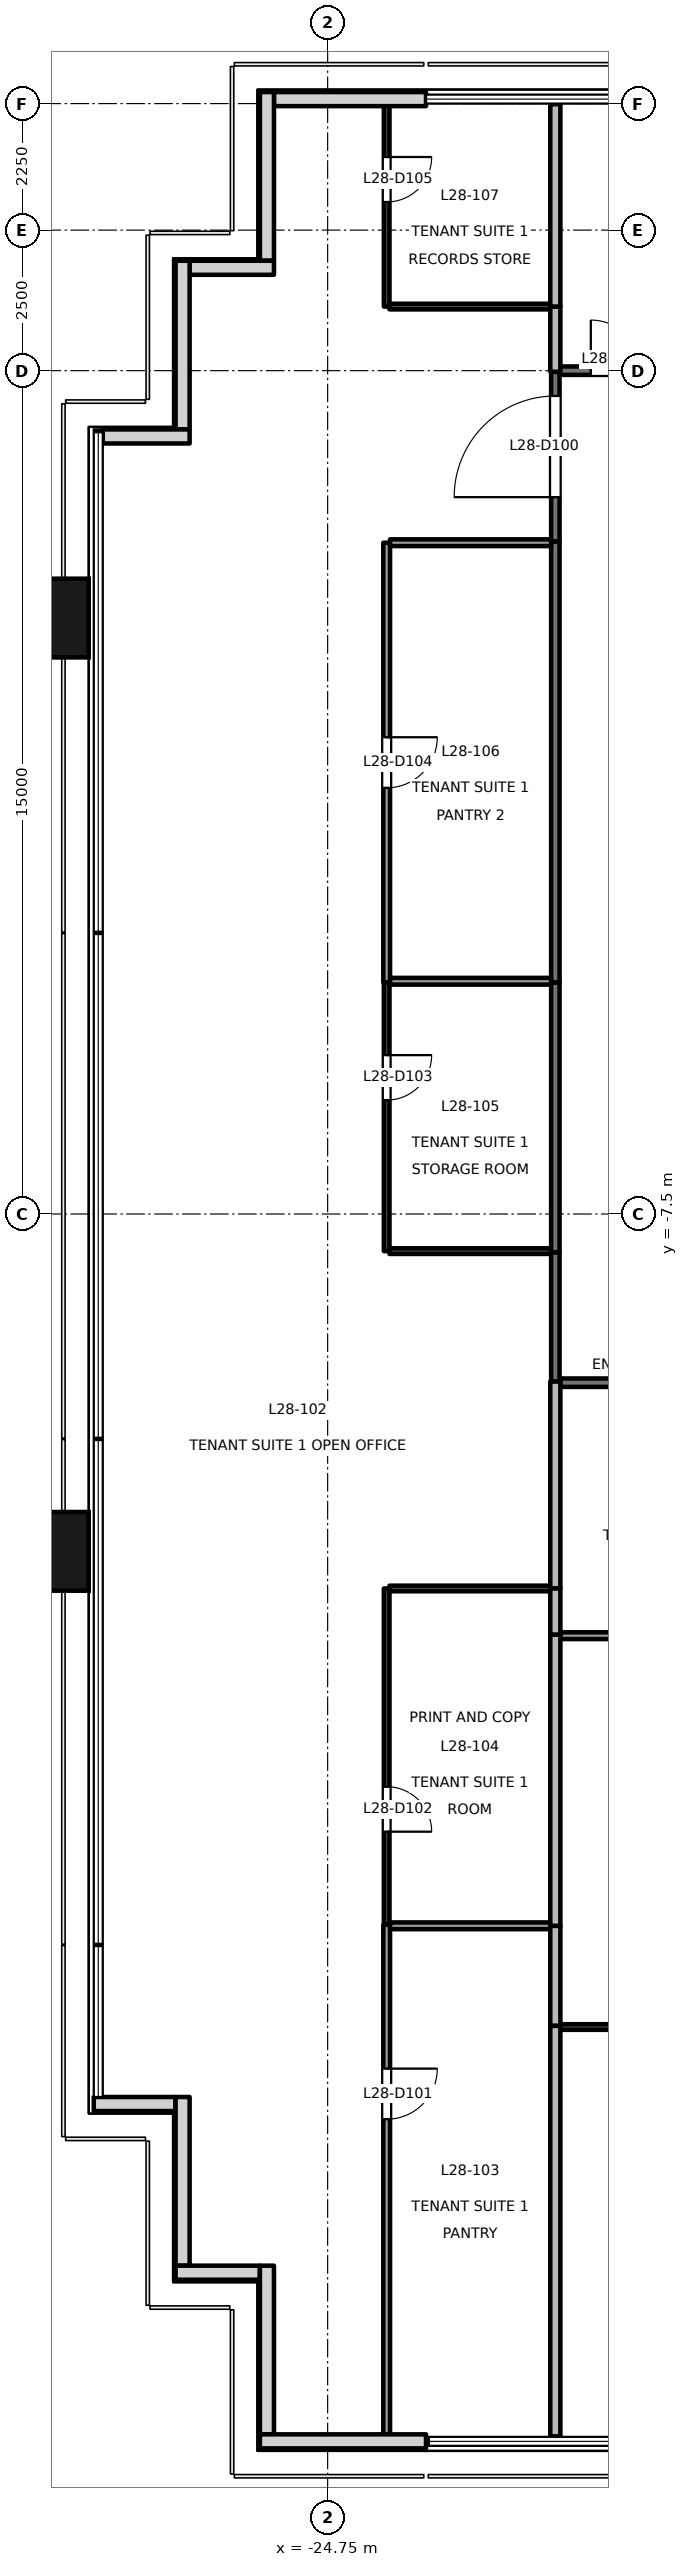
"""IFC4 building model, lengths in metres.
Left out: names, types, materials, properties, quantities, classifications, styles, units other than length and angle.
Written with IfcOpenShell. Run it as: python <this file> out.ifc"""

import sys

from ifc_helpers import new_model, si_unit, direction, frame, frame_2d, origin, origin_2d, place, context, subcontext, project, spatial, rectangle, extrude, element, fill, save


model = new_model("IFC4")
c1 = context("Model", 3, precision=1e-05, world=origin(), true_north=direction((0.0, 1.0)))
c2 = subcontext(c1, "Body", "Model", "MODEL_VIEW")
j1 = project(units=[si_unit("LENGTHUNIT", "METRE"), si_unit("PLANEANGLEUNIT", "RADIAN")], contexts=[c1])
p1 = place(None, origin())
s1 = spatial("IfcSite", under=j1, at=p1, CompositionType="ELEMENT")
p2 = place(p1, origin())
s2 = spatial("IfcBuilding", under=s1, at=p2, CompositionType="ELEMENT")
p3 = place(p2, frame((0.0, 0.0, 126.1)))
s3 = spatial("IfcBuildingStorey", under=s2, at=p3, CompositionType="ELEMENT", Elevation=126.1)
for number, where, z_axis, x_axis in (
    (1, (-29.9, -13.5, -0.2), (0.0, 0.0, 1.0), (0.0, 1.0, 0.0)),
    (2, (-29.9, 3.1, -0.2), (0.0, 0.0, 1.0), (0.0, 1.0, 0.0)),
):
    element("IfcColumn", number, at=place(p3, frame(where, z_axis=z_axis, x_axis=x_axis)), inside=s3, PredefinedType="COLUMN", context=c2, shape_type="SweptSolid", body=[
        extrude(rectangle(XDim=1.4, YDim=1.8, at=origin_2d()), origin(), (0.0, 0.0, 1.0), 4.0),
    ])
p4 = place(p3, frame((-23.0, 12.33, 0.0), z_axis=(0.0, 0.0, 1.0), x_axis=(-1.0, 0.0, 0.0)))
e3 = element("IfcWall", 3, at=p4, inside=s3, PredefinedType="SOLIDWALL", context=c2, shape_type="SweptSolid", body=[
    extrude(rectangle(XDim=2.705, YDim=0.25, at=frame_2d((1.353, 0.0))), origin(), (0.0, 0.0, 1.0), 3.8),
])
p5 = place(p3, frame((-25.83, 12.455, 0.0), z_axis=(0.0, 0.0, 1.0), x_axis=(0.0, -1.0, 0.0)))
e4 = element("IfcWall", 4, at=p5, inside=s3, PredefinedType="SOLIDWALL", context=c2, shape_type="SweptSolid", body=[
    extrude(rectangle(XDim=3.0, YDim=0.25, at=frame_2d((1.5, 0.0))), origin(), (0.0, 0.0, 1.0), 3.8),
])
p6 = place(p3, frame((-25.705, 9.33, 0.0), z_axis=(0.0, 0.0, 1.0), x_axis=(-1.0, 0.0, 0.0)))
e5 = element("IfcWall", 5, at=p6, inside=s3, PredefinedType="SOLIDWALL", context=c2, shape_type="SweptSolid", body=[
    extrude(rectangle(XDim=1.5, YDim=0.25, at=frame_2d((0.75, 0.0))), origin(), (0.0, 0.0, 1.0), 3.8),
])
p7 = place(p3, frame((-27.33, 9.455, 0.0), z_axis=(0.0, 0.0, 1.0), x_axis=(0.0, -1.0, 0.0)))
e6 = element("IfcWall", 6, at=p7, inside=s3, PredefinedType="SOLIDWALL", context=c2, shape_type="SweptSolid", body=[
    extrude(rectangle(XDim=3.0, YDim=0.25, at=frame_2d((1.5, 0.0))), origin(), (0.0, 0.0, 1.0), 3.8),
])
p8 = place(p3, frame((-27.205, 6.33, 0.0), z_axis=(0.0, 0.0, 1.0), x_axis=(-1.0, 0.0, 0.0)))
e7 = element("IfcWall", 7, at=p8, inside=s3, PredefinedType="SOLIDWALL", context=c2, shape_type="SweptSolid", body=[
    extrude(rectangle(XDim=1.545, YDim=0.25, at=frame_2d((0.772, 0.0))), origin(), (0.0, 0.0, 1.0), 3.8),
])
p9 = place(p3, frame((-28.91, -23.33, 0.0), z_axis=(0.0, 0.0, 1.0), x_axis=(1.0, 0.0, 0.0)))
e8 = element("IfcWall", 8, at=p9, inside=s3, PredefinedType="SOLIDWALL", context=c2, shape_type="SweptSolid", body=[
    extrude(rectangle(XDim=1.455, YDim=0.25, at=frame_2d((0.728, 0.0))), origin(), (0.0, 0.0, 1.0), 3.8),
])
p10 = place(p3, frame((-27.33, -23.205, 0.0), z_axis=(0.0, 0.0, 1.0), x_axis=(0.0, -1.0, 0.0)))
e9 = element("IfcWall", 9, at=p10, inside=s3, PredefinedType="SOLIDWALL", context=c2, shape_type="SweptSolid", body=[
    extrude(rectangle(XDim=3.0, YDim=0.25, at=frame_2d((1.5, 0.0))), origin(), (0.0, 0.0, 1.0), 3.8),
])
p11 = place(p3, frame((-27.455, -26.33, 0.0), z_axis=(0.0, 0.0, 1.0), x_axis=(1.0, 0.0, 0.0)))
e10 = element("IfcWall", 10, at=p11, inside=s3, PredefinedType="SOLIDWALL", context=c2, shape_type="SweptSolid", body=[
    extrude(rectangle(XDim=1.5, YDim=0.25, at=frame_2d((0.75, 0.0))), origin(), (0.0, 0.0, 1.0), 3.8),
])
p12 = place(p3, frame((-25.83, -26.205, 0.0), z_axis=(0.0, 0.0, 1.0), x_axis=(0.0, -1.0, 0.0)))
e11 = element("IfcWall", 11, at=p12, inside=s3, PredefinedType="SOLIDWALL", context=c2, shape_type="SweptSolid", body=[
    extrude(rectangle(XDim=3.0, YDim=0.25, at=frame_2d((1.5, 0.0))), origin(), (0.0, 0.0, 1.0), 3.8),
])
p13 = place(p3, frame((-25.955, -29.33, 0.0), z_axis=(0.0, 0.0, 1.0), x_axis=(1.0, 0.0, 0.0)))
e12 = element("IfcWall", 12, at=p13, inside=s3, PredefinedType="SOLIDWALL", context=c2, shape_type="SweptSolid", body=[
    extrude(rectangle(XDim=2.955, YDim=0.25, at=frame_2d((1.478, 0.0))), origin(), (0.0, 0.0, 1.0), 3.8),
])
p14 = place(p3, frame((-20.7, -10.48, 0.0), z_axis=(0.0, 0.0, 1.0), x_axis=(0.0, 1.0, 0.0)))
e13 = element("IfcWall", 13, at=p14, inside=s3, PredefinedType="PARTITIONING", context=c2, shape_type="SweptSolid", body=[
    extrude(rectangle(XDim=2.3, YDim=0.15, at=frame_2d((1.15, 0.0))), origin(), (0.0, 0.0, 1.0), 3.8),
])
p15 = place(p3, frame((-20.7, 4.46, 0.0), z_axis=(0.0, 0.0, 1.0), x_axis=(0.0, 1.0, 0.0)))
e14 = element("IfcWall", 14, at=p15, inside=s3, PredefinedType="PARTITIONING", context=c2, shape_type="SweptSolid", body=[
    extrude(rectangle(XDim=3.02, YDim=0.15, at=frame_2d((1.51, 0.0))), origin(), (0.0, 0.0, 1.0), 3.3),
])
p16 = place(p15, frame((0.79, 0.0, 0.0)))
e15 = element("IfcOpeningElement", 15, at=p16, cuts=e14, PredefinedType="OPENING", context=c2, shape_type="SweptSolid", body=[
    extrude(rectangle(XDim=1.8, YDim=2.1, at=frame_2d((0.9, 1.05))), frame((0.0, 0.085, 0.0), z_axis=(0.0, -1.0, 0.0), x_axis=(1.0, 0.0, 0.0)), (0.0, 0.0, 1.0), 0.171),
])
p17 = place(p3, frame((-20.7, -8.18, 0.0), z_axis=(0.0, 0.0, 1.0), x_axis=(0.0, 1.0, 0.0)))
e16 = element("IfcWall", 16, at=p17, inside=s3, PredefinedType="PARTITIONING", context=c2, shape_type="SweptSolid", body=[
    extrude(rectangle(XDim=4.8, YDim=0.15, at=frame_2d((2.4, 0.0))), origin(), (0.0, 0.0, 1.0), 3.3),
])
p18 = place(p3, frame((-20.7, -3.38, 0.0), z_axis=(0.0, 0.0, 1.0), x_axis=(0.0, 1.0, 0.0)))
e17 = element("IfcWall", 17, at=p18, inside=s3, PredefinedType="PARTITIONING", context=c2, shape_type="SweptSolid", body=[
    extrude(rectangle(XDim=7.84, YDim=0.15, at=frame_2d((3.92, 0.0))), origin(), (0.0, 0.0, 1.0), 3.3),
])
p19 = place(p3, frame((-15.92, -10.5, 0.0), z_axis=(0.0, 0.0, 1.0), x_axis=(-1.0, 0.0, 0.0)))
e18 = element("IfcWall", 18, at=p19, inside=s3, PredefinedType="PARTITIONING", context=c2, shape_type="SweptSolid", body=[
    extrude(rectangle(XDim=4.69, YDim=0.15, at=frame_2d((2.345, 0.0))), origin(), (0.0, 0.0, 1.0), 3.8),
])
p20 = place(p3, frame((-20.625, 7.5, 0.0), z_axis=(0.0, 0.0, 1.0), x_axis=(1.0, 0.0, 0.0)))
e19 = element("IfcWall", 19, at=p20, inside=s3, PredefinedType="PARTITIONING", context=c2, shape_type="SweptSolid", body=[
    extrude(rectangle(XDim=2.625, YDim=0.15, at=frame_2d((1.312, 0.0))), origin(), (0.0, 0.0, 1.0), 3.8),
])
p21 = place(p20, frame((0.556, 0.0, 0.0)))
e20 = element("IfcOpeningElement", 20, at=p21, cuts=e19, PredefinedType="OPENING", context=c2, shape_type="SweptSolid", body=[
    extrude(rectangle(XDim=0.9, YDim=2.1, at=frame_2d((0.45, 1.05))), frame((0.0, 0.085, 0.0), z_axis=(0.0, -1.0, 0.0), x_axis=(1.0, 0.0, 0.0)), (0.0, 0.0, 1.0), 0.171),
])
p22 = place(p3, frame((-23.7, -20.14, 0.0), z_axis=(0.0, 0.0, 1.0), x_axis=(0.0, -1.0, 0.0)))
e21 = element("IfcWall", 21, at=p22, inside=s3, PredefinedType="PARTITIONING", context=c2, shape_type="SweptSolid", body=[
    extrude(rectangle(XDim=9.1, YDim=0.12, at=frame_2d((4.55, 0.0))), origin(), (0.0, 0.0, 1.0), 3.8),
])
p23 = place(p22, frame((2.56, 0.0, 0.0)))
e22 = element("IfcOpeningElement", 22, at=p23, cuts=e21, PredefinedType="OPENING", context=c2, shape_type="SweptSolid", body=[
    extrude(rectangle(XDim=0.9, YDim=2.1, at=frame_2d((0.45, 1.05))), frame((0.0, 0.071, 0.0), z_axis=(0.0, -1.0, 0.0), x_axis=(1.0, 0.0, 0.0)), (0.0, 0.0, 1.0), 0.141),
])
p24 = place(p3, frame((-23.7, -14.16, 0.0), z_axis=(0.0, 0.0, 1.0), x_axis=(0.0, -1.0, 0.0)))
e23 = element("IfcWall", 23, at=p24, inside=s3, PredefinedType="PARTITIONING", context=c2, shape_type="SweptSolid", body=[
    extrude(rectangle(XDim=5.98, YDim=0.1, at=frame_2d((2.99, 0.0))), origin(), (0.0, 0.0, 1.0), 3.8),
])
p25 = place(p24, frame((3.526, 0.0, 0.0)))
e24 = element("IfcOpeningElement", 24, at=p25, cuts=e23, PredefinedType="OPENING", context=c2, shape_type="SweptSolid", body=[
    extrude(rectangle(XDim=0.8, YDim=2.1, at=frame_2d((0.4, 1.05))), frame((0.0, 0.061, 0.0), z_axis=(0.0, -1.0, 0.0), x_axis=(1.0, 0.0, 0.0)), (0.0, 0.0, 1.0), 0.121),
])
p26 = place(p3, frame((-20.79, -14.16, 0.0), z_axis=(0.0, 0.0, 1.0), x_axis=(-1.0, 0.0, 0.0)))
e25 = element("IfcWall", 25, at=p26, inside=s3, PredefinedType="PARTITIONING", context=c2, shape_type="SweptSolid", body=[
    extrude(rectangle(XDim=2.86, YDim=0.1, at=frame_2d((1.43, 0.0))), origin(), (0.0, 0.0, 1.0), 3.8),
])
p27 = place(p3, frame((-23.7, -3.38, 0.0), z_axis=(0.0, 0.0, 1.0), x_axis=(0.0, -1.0, 0.0)))
e26 = element("IfcWall", 26, at=p27, inside=s3, PredefinedType="PARTITIONING", context=c2, shape_type="SweptSolid", body=[
    extrude(rectangle(XDim=4.78, YDim=0.1, at=frame_2d((2.39, 0.0))), origin(), (0.0, 0.0, 1.0), 3.3),
])
p28 = place(p27, frame((1.294, 0.0, 0.0)))
e27 = element("IfcOpeningElement", 27, at=p28, cuts=e26, PredefinedType="OPENING", context=c2, shape_type="SweptSolid", body=[
    extrude(rectangle(XDim=0.8, YDim=2.1, at=frame_2d((0.4, 1.05))), frame((0.0, 0.061, 0.0), z_axis=(0.0, -1.0, 0.0), x_axis=(1.0, 0.0, 0.0)), (0.0, 0.0, 1.0), 0.121),
])
p29 = place(p3, frame((-23.65, -8.16, 0.0), z_axis=(0.0, 0.0, 1.0), x_axis=(1.0, 0.0, 0.0)))
e28 = element("IfcWall", 28, at=p29, inside=s3, PredefinedType="PARTITIONING", context=c2, shape_type="SweptSolid", body=[
    extrude(rectangle(XDim=2.875, YDim=0.1, at=frame_2d((1.438, 0.0))), origin(), (0.0, 0.0, 1.0), 3.8),
])
p30 = place(p3, frame((-23.7, 4.44, 0.0), z_axis=(0.0, 0.0, 1.0), x_axis=(0.0, -1.0, 0.0)))
e29 = element("IfcWall", 29, at=p30, inside=s3, PredefinedType="PARTITIONING", context=c2, shape_type="SweptSolid", body=[
    extrude(rectangle(XDim=7.82, YDim=0.12, at=frame_2d((3.91, 0.0))), origin(), (0.0, 0.0, 1.0), 3.3),
])
p31 = place(p30, frame((3.46, 0.0, 0.0)))
e30 = element("IfcOpeningElement", 30, at=p31, cuts=e29, PredefinedType="OPENING", context=c2, shape_type="SweptSolid", body=[
    extrude(rectangle(XDim=0.9, YDim=2.1, at=frame_2d((0.45, 1.05))), frame((0.0, 0.071, 0.0), z_axis=(0.0, -1.0, 0.0), x_axis=(1.0, 0.0, 0.0)), (0.0, 0.0, 1.0), 0.141),
])
p32 = place(p3, frame((-20.775, 4.44, 0.0), z_axis=(0.0, 0.0, 1.0), x_axis=(-1.0, 0.0, 0.0)))
e31 = element("IfcWall", 31, at=p32, inside=s3, PredefinedType="PARTITIONING", context=c2, shape_type="SweptSolid", body=[
    extrude(rectangle(XDim=2.865, YDim=0.12, at=frame_2d((1.433, 0.0))), origin(), (0.0, 0.0, 1.0), 3.3),
])
p33 = place(p3, frame((-23.7, 12.24, 0.0), z_axis=(0.0, 0.0, 1.0), x_axis=(0.0, -1.0, 0.0)))
e32 = element("IfcWall", 32, at=p33, inside=s3, PredefinedType="PARTITIONING", context=c2, shape_type="SweptSolid", body=[
    extrude(rectangle(XDim=3.6, YDim=0.1, at=frame_2d((1.8, 0.0))), origin(), (0.0, 0.0, 1.0), 3.8),
])
p34 = place(p33, frame((0.94, 0.0, 0.0)))
e33 = element("IfcOpeningElement", 33, at=p34, cuts=e32, PredefinedType="OPENING", context=c2, shape_type="SweptSolid", body=[
    extrude(rectangle(XDim=0.8, YDim=2.1, at=frame_2d((0.4, 1.05))), frame((0.0, 0.061, 0.0), z_axis=(0.0, -1.0, 0.0), x_axis=(1.0, 0.0, 0.0)), (0.0, 0.0, 1.0), 0.121),
])
p35 = place(p3, frame((-23.65, 8.64, 0.0), z_axis=(0.0, 0.0, 1.0), x_axis=(1.0, 0.0, 0.0)))
e34 = element("IfcWall", 34, at=p35, inside=s3, PredefinedType="PARTITIONING", context=c2, shape_type="SweptSolid", body=[
    extrude(rectangle(XDim=2.86, YDim=0.1, at=frame_2d((1.43, 0.0))), origin(), (0.0, 0.0, 1.0), 3.8),
])
p36 = place(p3, frame((-20.7, -10.48, 0.0), z_axis=(0.0, 0.0, 1.0), x_axis=(0.0, -1.0, 0.0)))
e35 = element("IfcWall", 35, at=p36, inside=s3, PredefinedType="PARTITIONING", context=c2, shape_type="SweptSolid", body=[
    extrude(rectangle(XDim=3.68, YDim=0.18, at=frame_2d((1.84, 0.0))), origin(), (0.0, 0.0, 1.0), 3.8),
])
p37 = place(p3, frame((-20.7, 8.64, 0.0), z_axis=(0.0, 0.0, 1.0), x_axis=(0.0, -1.0, 0.0)))
e36 = element("IfcWall", 36, at=p37, inside=s3, PredefinedType="PARTITIONING", context=c2, shape_type="SweptSolid", body=[
    extrude(rectangle(XDim=1.16, YDim=0.18, at=frame_2d((0.58, 0.0))), origin(), (0.0, 0.0, 1.0), 3.8),
])
p38 = place(p3, frame((-23.64, -20.16, 0.0), z_axis=(0.0, 0.0, 1.0), x_axis=(1.0, 0.0, 0.0)))
e37 = element("IfcWall", 37, at=p38, inside=s3, PredefinedType="PARTITIONING", context=c2, shape_type="SweptSolid", body=[
    extrude(rectangle(XDim=2.85, YDim=0.12, at=frame_2d((1.425, 0.0))), origin(), (0.0, 0.0, 1.0), 3.8),
])
p39 = place(p3, frame((-20.7, -20.16, 0.0), z_axis=(0.0, 0.0, 1.0), x_axis=(0.0, -1.0, 0.0)))
e38 = element("IfcWall", 38, at=p39, inside=s3, PredefinedType="PARTITIONING", context=c2, shape_type="SweptSolid", body=[
    extrude(rectangle(XDim=1.78, YDim=0.18, at=frame_2d((0.89, 0.0))), origin(), (0.0, 0.0, 1.0), 3.8),
])
p40 = place(p3, frame((-20.7, -21.94, 0.0), z_axis=(0.0, 0.0, 1.0), x_axis=(0.0, -1.0, 0.0)))
e39 = element("IfcWall", 39, at=p40, inside=s3, PredefinedType="PARTITIONING", context=c2, shape_type="SweptSolid", body=[
    extrude(rectangle(XDim=7.3, YDim=0.18, at=frame_2d((3.65, 0.0))), origin(), (0.0, 0.0, 1.0), 3.8),
])
p41 = place(p3, frame((-20.7, -14.98, 0.0), z_axis=(0.0, 0.0, 1.0), x_axis=(0.0, -1.0, 0.0)))
e40 = element("IfcWall", 40, at=p41, inside=s3, PredefinedType="PARTITIONING", context=c2, shape_type="SweptSolid", body=[
    extrude(rectangle(XDim=5.18, YDim=0.18, at=frame_2d((2.59, 0.0))), origin(), (0.0, 0.0, 1.0), 3.8),
])
p42 = place(p3, frame((-20.7, -14.16, 0.0), z_axis=(0.0, 0.0, 1.0), x_axis=(0.0, -1.0, 0.0)))
e41 = element("IfcWall", 41, at=p42, inside=s3, PredefinedType="PARTITIONING", context=c2, shape_type="SweptSolid", body=[
    extrude(rectangle(XDim=0.82, YDim=0.18, at=frame_2d((0.41, 0.0))), origin(), (0.0, 0.0, 1.0), 3.8),
])
p43 = place(p3, frame((-23.64, -3.36, 0.0), z_axis=(0.0, 0.0, 1.0), x_axis=(1.0, 0.0, 0.0)))
e42 = element("IfcWall", 42, at=p43, inside=s3, PredefinedType="PARTITIONING", context=c2, shape_type="SweptSolid", body=[
    extrude(rectangle(XDim=2.865, YDim=0.12, at=frame_2d((1.433, 0.0))), origin(), (0.0, 0.0, 1.0), 3.8),
])
p44 = place(p3, frame((-20.7, 12.24, 0.0), z_axis=(0.0, 0.0, 1.0), x_axis=(0.0, -1.0, 0.0)))
e43 = element("IfcWall", 43, at=p44, inside=s3, PredefinedType="PARTITIONING", context=c2, shape_type="SweptSolid", body=[
    extrude(rectangle(XDim=3.6, YDim=0.18, at=frame_2d((1.8, 0.0))), origin(), (0.0, 0.0, 1.0), 3.8),
])
p45 = place(p3, frame((-13.85, -21.96, 0.0), z_axis=(0.0, 0.0, 1.0), x_axis=(-1.0, 0.0, 0.0)))
e44 = element("IfcWall", 44, at=p45, inside=s3, PredefinedType="PARTITIONING", context=c2, shape_type="SweptSolid", body=[
    extrude(rectangle(XDim=6.76, YDim=0.1, at=frame_2d((3.38, 0.0))), origin(), (0.0, 0.0, 1.0), 3.8),
])
p46 = place(p45, frame((2.48, 0.0, 0.9)))
e45 = element("IfcOpeningElement", 45, at=p46, cuts=e44, PredefinedType="OPENING", context=c2, shape_type="SweptSolid", body=[
    extrude(rectangle(XDim=1.8, YDim=1.2, at=frame_2d((0.9, 0.6))), frame((0.0, 0.061, 0.0), z_axis=(0.0, -1.0, 0.0), x_axis=(1.0, 0.0, 0.0)), (0.0, 0.0, 1.0), 0.121),
])
p47 = place(p3, frame((-20.61, -15.0, 0.0), z_axis=(0.0, 0.0, 1.0), x_axis=(1.0, 0.0, 0.0)))
e46 = element("IfcWall", 46, at=p47, inside=s3, PredefinedType="PARTITIONING", context=c2, shape_type="SweptSolid", body=[
    extrude(rectangle(XDim=4.73, YDim=0.12, at=frame_2d((2.365, 0.0))), origin(), (0.0, 0.0, 1.0), 3.8),
])
p48 = place(p47, frame((1.249, 0.0, 0.0)))
e47 = element("IfcOpeningElement", 47, at=p48, cuts=e46, PredefinedType="OPENING", context=c2, shape_type="SweptSolid", body=[
    extrude(rectangle(XDim=0.9, YDim=2.1, at=frame_2d((0.45, 1.05))), frame((0.0, 0.071, 0.0), z_axis=(0.0, -1.0, 0.0), x_axis=(1.0, 0.0, 0.0)), (0.0, 0.0, 1.0), 0.141),
])
p49 = place(p16, origin())
e48 = element("IfcDoor", 48, at=p49, inside=s3, OperationType="DOUBLE_DOOR_SINGLE_SWING", PredefinedType="DOOR", context=c2, shape_type="SweptSolid", body=[
    extrude(rectangle(XDim=1.8, YDim=2.1, at=frame_2d((0.9, 1.05))), frame((0.0, 0.025, 0.0), z_axis=(0.0, -1.0, 0.0), x_axis=(1.0, 0.0, 0.0)), (0.0, 0.0, 1.0), 0.05),
])
fill(e15, e48)
p50 = place(p23, origin())
e49 = element("IfcDoor", 49, at=p50, inside=s3, OperationType="SINGLE_SWING_LEFT", PredefinedType="DOOR", context=c2, shape_type="SweptSolid", body=[
    extrude(rectangle(XDim=0.9, YDim=2.1, at=frame_2d((0.45, 1.05))), frame((0.0, 0.025, 0.0), z_axis=(0.0, -1.0, 0.0), x_axis=(1.0, 0.0, 0.0)), (0.0, 0.0, 1.0), 0.05),
])
fill(e22, e49)
p51 = place(p25, origin())
e50 = element("IfcDoor", 50, at=p51, inside=s3, OperationType="SINGLE_SWING_RIGHT", PredefinedType="DOOR", context=c2, shape_type="SweptSolid", body=[
    extrude(rectangle(XDim=0.8, YDim=2.1, at=frame_2d((0.4, 1.05))), frame((0.0, 0.025, 0.0), z_axis=(0.0, -1.0, 0.0), x_axis=(1.0, 0.0, 0.0)), (0.0, 0.0, 1.0), 0.05),
])
fill(e24, e50)
p52 = place(p28, origin())
e51 = element("IfcDoor", 51, at=p52, inside=s3, OperationType="SINGLE_SWING_LEFT", PredefinedType="DOOR", context=c2, shape_type="SweptSolid", body=[
    extrude(rectangle(XDim=0.8, YDim=2.1, at=frame_2d((0.4, 1.05))), frame((0.0, 0.025, 0.0), z_axis=(0.0, -1.0, 0.0), x_axis=(1.0, 0.0, 0.0)), (0.0, 0.0, 1.0), 0.05),
])
fill(e27, e51)
p53 = place(p31, origin())
e52 = element("IfcDoor", 52, at=p53, inside=s3, OperationType="SINGLE_SWING_LEFT", PredefinedType="DOOR", context=c2, shape_type="SweptSolid", body=[
    extrude(rectangle(XDim=0.9, YDim=2.1, at=frame_2d((0.45, 1.05))), frame((0.0, 0.025, 0.0), z_axis=(0.0, -1.0, 0.0), x_axis=(1.0, 0.0, 0.0)), (0.0, 0.0, 1.0), 0.05),
])
fill(e30, e52)
p54 = place(p34, origin())
e53 = element("IfcDoor", 53, at=p54, inside=s3, OperationType="SINGLE_SWING_LEFT", PredefinedType="DOOR", context=c2, shape_type="SweptSolid", body=[
    extrude(rectangle(XDim=0.8, YDim=2.1, at=frame_2d((0.4, 1.05))), frame((0.0, 0.025, 0.0), z_axis=(0.0, -1.0, 0.0), x_axis=(1.0, 0.0, 0.0)), (0.0, 0.0, 1.0), 0.05),
])
fill(e33, e53)
p55 = place(p21, origin())
e54 = element("IfcDoor", 54, at=p55, inside=s3, OperationType="SINGLE_SWING_LEFT", PredefinedType="DOOR", context=c2, shape_type="SweptSolid", body=[
    extrude(rectangle(XDim=0.9, YDim=2.1, at=frame_2d((0.45, 1.05))), frame((0.0, 0.025, 0.0), z_axis=(0.0, -1.0, 0.0), x_axis=(1.0, 0.0, 0.0)), (0.0, 0.0, 1.0), 0.05),
])
fill(e20, e54)
save(model, sys.argv[1])
